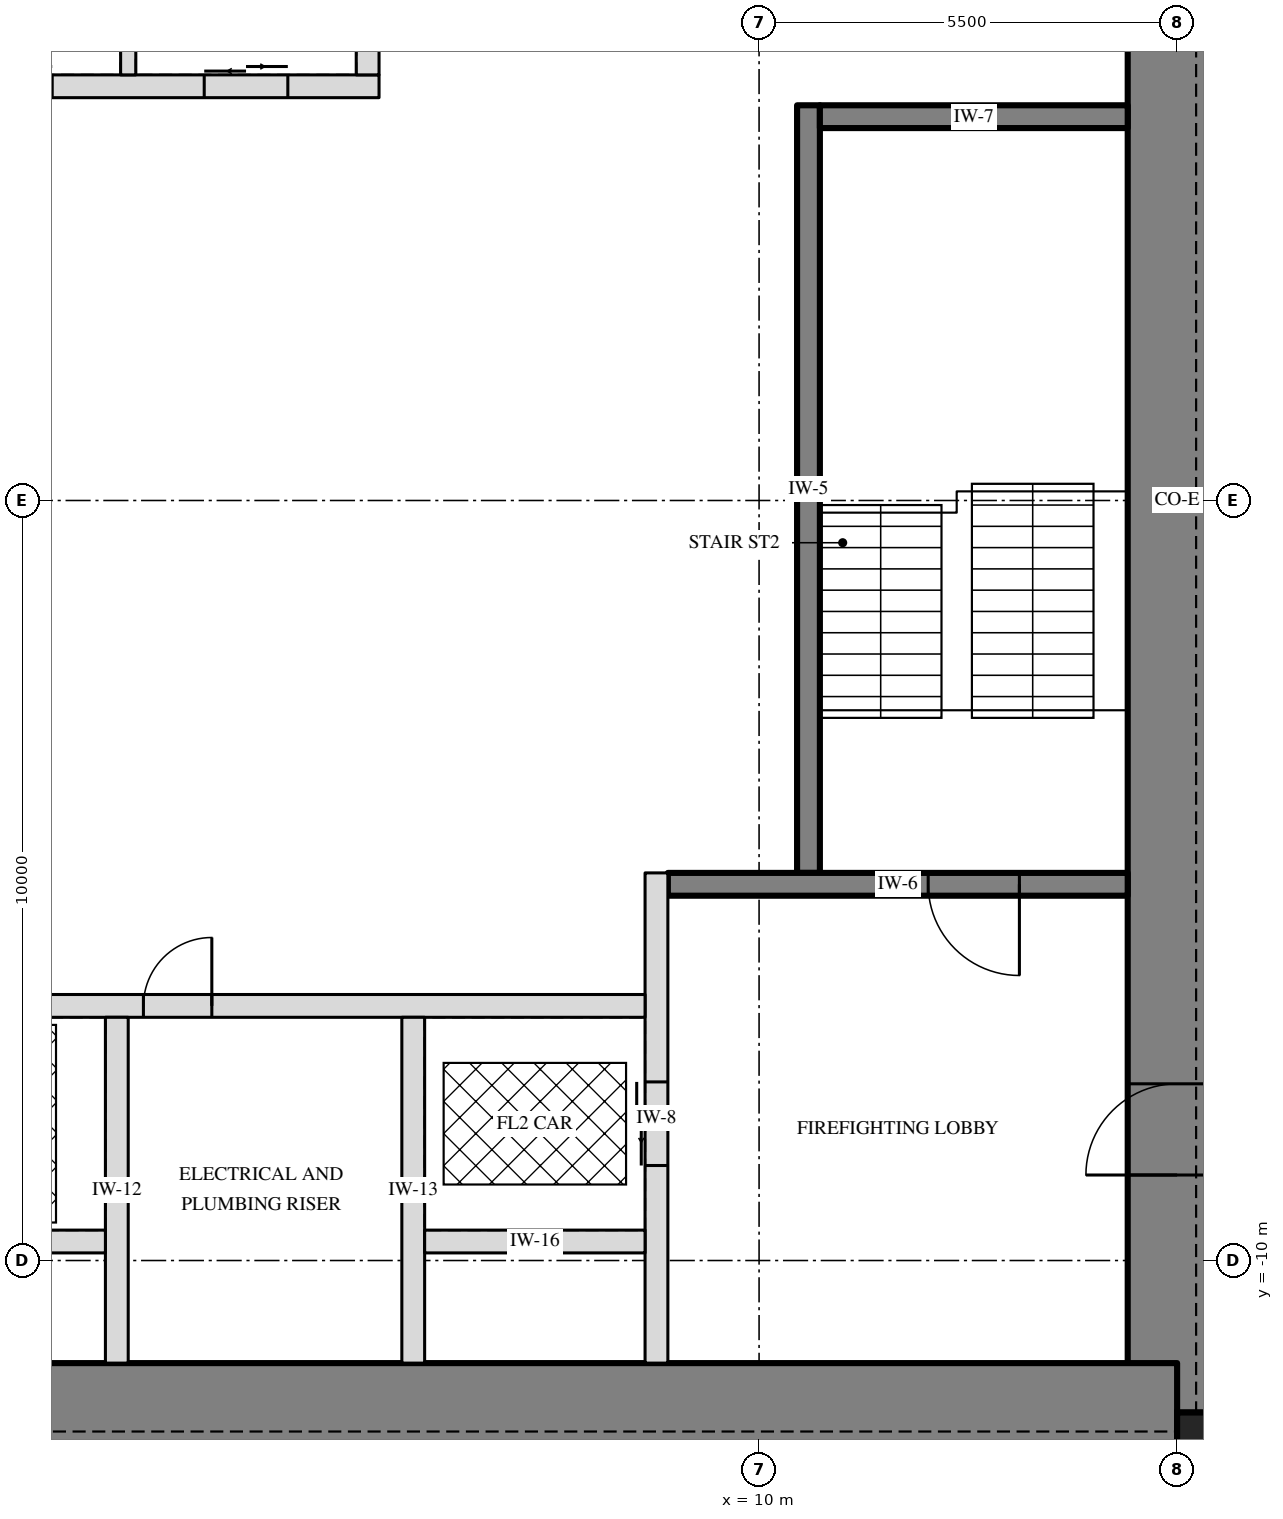
"""IFC4 building model, lengths in metres.
Left out: names, types, materials, properties, quantities, classifications, styles, units other than length and angle.
Written with IfcOpenShell. Run it as: python <this file> out.ifc"""

import sys

from ifc_helpers import new_model, si_unit, direction, frame, frame_2d, origin, origin_2d, place, context, subcontext, project, spatial, rectangle, extrude, element, fill, save


model = new_model("IFC4")
c1 = context("Model", 3, precision=1e-05, world=origin(), true_north=direction((0.0, 1.0)))
c2 = subcontext(c1, "Body", "Model", "MODEL_VIEW")
j1 = project(units=[si_unit("LENGTHUNIT", "METRE"), si_unit("PLANEANGLEUNIT", "RADIAN")], contexts=[c1])
p1 = place(None, origin())
s1 = spatial("IfcSite", under=j1, at=p1, CompositionType="ELEMENT")
p2 = place(p1, origin())
s2 = spatial("IfcBuilding", under=s1, at=p2, CompositionType="ELEMENT")
p3 = place(p2, frame((0.0, 0.0, 285.75)))
s3 = spatial("IfcBuildingStorey", under=s2, at=p3, CompositionType="ELEMENT", Elevation=285.75)
p4 = place(p3, frame((15.5, -12.0, -0.25), z_axis=(0.0, 0.0, 1.0), x_axis=(0.0, 1.0, 0.0)))
e1 = element("IfcWall", 1, at=p4, inside=s3, PredefinedType="SHEAR", context=c2, shape_type="SweptSolid", body=[
    extrude(rectangle(XDim=24.0, YDim=1.3, at=frame_2d((12.0, 0.0))), origin(), (0.0, 0.0, 1.0), 3.75),
])
p5 = place(p4, frame((3.125, 0.0, 0.25)))
e2 = element("IfcOpeningElement", 2, at=p5, cuts=e1, PredefinedType="OPENING", context=c2, shape_type="SweptSolid", body=[
    extrude(rectangle(XDim=1.2, YDim=2.1, at=frame_2d((0.6, 1.05))), frame((0.0, 0.66, 0.0), z_axis=(0.0, -1.0, 0.0), x_axis=(1.0, 0.0, 0.0)), (0.0, 0.0, 1.0), 1.32),
])
p6 = place(p4, frame((19.375, 0.0, 0.25)))
e3 = element("IfcOpeningElement", 3, at=p6, cuts=e1, PredefinedType="OPENING", context=c2, shape_type="SweptSolid", body=[
    extrude(rectangle(XDim=1.8, YDim=2.1, at=frame_2d((0.9, 1.05))), frame((0.0, 0.66, 0.0), z_axis=(0.0, -1.0, 0.0), x_axis=(1.0, 0.0, 0.0)), (0.0, 0.0, 1.0), 1.32),
])
p7 = place(p3, frame((-15.5, -12.0, -0.25), z_axis=(0.0, 0.0, 1.0), x_axis=(1.0, 0.0, 0.0)))
e4 = element("IfcWall", 4, at=p7, inside=s3, PredefinedType="SHEAR", context=c2, shape_type="SweptSolid", body=[
    extrude(rectangle(XDim=31.0, YDim=1.3, at=frame_2d((15.5, 0.0))), origin(), (0.0, 0.0, 1.0), 3.75),
])
p8 = place(p3, frame((15.825, -12.325, -0.25), z_axis=(0.0, 0.0, 1.0), x_axis=(1.0, 0.0, 0.0)))
e5 = element("IfcColumn", 5, at=p8, inside=s3, PredefinedType="COLUMN", context=c2, shape_type="SweptSolid", body=[
    extrude(rectangle(XDim=0.65, YDim=0.65, at=origin_2d()), origin(), (0.0, 0.0, 1.0), 3.75),
])
p9 = place(p3, frame((10.65, -4.9, 0.0), z_axis=(0.0, 0.0, 1.0), x_axis=(0.0, 1.0, 0.0)))
e6 = element("IfcWall", 6, at=p9, inside=s3, PredefinedType="SOLIDWALL", context=c2, shape_type="SweptSolid", body=[
    extrude(rectangle(XDim=10.1, YDim=0.3, at=frame_2d((5.05, 0.0))), origin(), (0.0, 0.0, 1.0), 3.5),
])
p10 = place(p3, frame((14.85, -5.05, 0.0), z_axis=(0.0, 0.0, 1.0), x_axis=(-1.0, 0.0, 0.0)))
e7 = element("IfcWall", 7, at=p10, inside=s3, PredefinedType="SOLIDWALL", context=c2, shape_type="SweptSolid", body=[
    extrude(rectangle(XDim=6.05, YDim=0.3, at=frame_2d((3.025, 0.0))), origin(), (0.0, 0.0, 1.0), 3.5),
])
p11 = place(p10, frame((1.425, 0.0, 0.0)))
e8 = element("IfcOpeningElement", 8, at=p11, cuts=e7, PredefinedType="OPENING", context=c2, shape_type="SweptSolid", body=[
    extrude(rectangle(XDim=1.2, YDim=2.1, at=frame_2d((0.6, 1.05))), frame((0.0, 0.16, 0.0), z_axis=(0.0, -1.0, 0.0), x_axis=(1.0, 0.0, 0.0)), (0.0, 0.0, 1.0), 0.32),
])
p12 = place(p3, frame((14.85, 5.05, 0.0), z_axis=(0.0, 0.0, 1.0), x_axis=(-1.0, 0.0, 0.0)))
e9 = element("IfcWall", 9, at=p12, inside=s3, PredefinedType="SOLIDWALL", context=c2, shape_type="SweptSolid", body=[
    extrude(rectangle(XDim=4.05, YDim=0.3, at=frame_2d((2.025, 0.0))), origin(), (0.0, 0.0, 1.0), 3.5),
])
p13 = place(p3, frame((8.65, -11.35, 0.0), z_axis=(0.0, 0.0, 1.0), x_axis=(0.0, 1.0, 0.0)))
e10 = element("IfcWall", 10, at=p13, inside=s3, PredefinedType="PARTITIONING", context=c2, shape_type="SweptSolid", body=[
    extrude(rectangle(XDim=6.45, YDim=0.3, at=frame_2d((3.225, 0.0))), origin(), (0.0, 0.0, 1.0), 3.5),
])
p14 = place(p13, frame((2.6, 0.0, 0.0)))
e11 = element("IfcOpeningElement", 11, at=p14, cuts=e10, PredefinedType="OPENING", context=c2, shape_type="SweptSolid", body=[
    extrude(rectangle(XDim=1.1, YDim=2.1, at=frame_2d((0.55, 1.05))), frame((0.0, 0.16, 0.0), z_axis=(0.0, -1.0, 0.0), x_axis=(1.0, 0.0, 0.0)), (0.0, 0.0, 1.0), 0.32),
])
p15 = place(p3, frame((-8.5, -6.65, 0.0), z_axis=(0.0, 0.0, 1.0), x_axis=(1.0, 0.0, 0.0)))
e12 = element("IfcWall", 12, at=p15, inside=s3, PredefinedType="PARTITIONING", context=c2, shape_type="SweptSolid", body=[
    extrude(rectangle(XDim=17.0, YDim=0.3, at=frame_2d((8.5, 0.0))), origin(), (0.0, 0.0, 1.0), 3.5),
])
p16 = place(p15, frame((7.8, 0.0, 0.0)))
e13 = element("IfcOpeningElement", 13, at=p16, cuts=e12, PredefinedType="OPENING", context=c2, shape_type="SweptSolid", body=[
    extrude(rectangle(XDim=1.3, YDim=2.4, at=frame_2d((0.65, 1.2))), frame((0.0, 0.16, 0.0), z_axis=(0.0, -1.0, 0.0), x_axis=(1.0, 0.0, 0.0)), (0.0, 0.0, 1.0), 0.32),
])
p17 = place(p15, frame((5.65, 0.0, 0.0)))
e14 = element("IfcOpeningElement", 14, at=p17, cuts=e12, PredefinedType="OPENING", context=c2, shape_type="SweptSolid", body=[
    extrude(rectangle(XDim=0.9, YDim=2.1, at=frame_2d((0.45, 1.05))), frame((0.0, 0.16, 0.0), z_axis=(0.0, -1.0, 0.0), x_axis=(1.0, 0.0, 0.0)), (0.0, 0.0, 1.0), 0.32),
])
p18 = place(p15, frame((10.4, 0.0, 0.0)))
e15 = element("IfcOpeningElement", 15, at=p18, cuts=e12, PredefinedType="OPENING", context=c2, shape_type="SweptSolid", body=[
    extrude(rectangle(XDim=0.9, YDim=2.1, at=frame_2d((0.45, 1.05))), frame((0.0, 0.16, 0.0), z_axis=(0.0, -1.0, 0.0), x_axis=(1.0, 0.0, 0.0)), (0.0, 0.0, 1.0), 0.32),
])
for number, where, z_axis, x_axis in (
    (16, (1.55, -11.35, 0.0), (0.0, 0.0, 1.0), (0.0, 1.0, 0.0)),
    (17, (5.45, -11.35, 0.0), (0.0, 0.0, 1.0), (0.0, 1.0, 0.0)),
):
    element("IfcWall", number, at=place(p3, frame(where, z_axis=z_axis, x_axis=x_axis)), inside=s3, PredefinedType="PARTITIONING", context=c2, shape_type="SweptSolid", body=[
        extrude(rectangle(XDim=4.55, YDim=0.3, at=frame_2d((2.275, 0.0))), origin(), (0.0, 0.0, 1.0), 3.5),
    ])
for number, where, z_axis, x_axis in (
    (18, (-1.5, -9.75, 0.0), (0.0, 0.0, 1.0), (1.0, 0.0, 0.0)),
    (19, (5.6, -9.75, 0.0), (0.0, 0.0, 1.0), (1.0, 0.0, 0.0)),
):
    element("IfcWall", number, at=place(p3, frame(where, z_axis=z_axis, x_axis=x_axis)), inside=s3, PredefinedType="PARTITIONING", context=c2, shape_type="SweptSolid", body=[
        extrude(rectangle(XDim=2.9, YDim=0.3, at=frame_2d((1.45, 0.0))), origin(), (0.0, 0.0, 1.0), 3.5),
    ])
p19 = place(p3, frame((-4.7, 5.45, 0.0), z_axis=(0.0, 0.0, 1.0), x_axis=(1.0, 0.0, 0.0)))
e20 = element("IfcWall", 20, at=p19, inside=s3, PredefinedType="PARTITIONING", context=c2, shape_type="SweptSolid", body=[
    extrude(rectangle(XDim=9.7, YDim=0.3, at=frame_2d((4.85, 0.0))), origin(), (0.0, 0.0, 1.0), 3.5),
])
p20 = place(p19, frame((1.2, 0.0, 0.0)))
e21 = element("IfcOpeningElement", 21, at=p20, cuts=e20, PredefinedType="OPENING", context=c2, shape_type="SweptSolid", body=[
    extrude(rectangle(XDim=1.1, YDim=2.1, at=frame_2d((0.55, 1.05))), frame((0.0, 0.16, 0.0), z_axis=(0.0, -1.0, 0.0), x_axis=(1.0, 0.0, 0.0)), (0.0, 0.0, 1.0), 0.32),
])
p21 = place(p19, frame((4.3, 0.0, 0.0)))
e22 = element("IfcOpeningElement", 22, at=p21, cuts=e20, PredefinedType="OPENING", context=c2, shape_type="SweptSolid", body=[
    extrude(rectangle(XDim=1.1, YDim=2.1, at=frame_2d((0.55, 1.05))), frame((0.0, 0.16, 0.0), z_axis=(0.0, -1.0, 0.0), x_axis=(1.0, 0.0, 0.0)), (0.0, 0.0, 1.0), 0.32),
])
p22 = place(p19, frame((7.4, 0.0, 0.0)))
e23 = element("IfcOpeningElement", 23, at=p22, cuts=e20, PredefinedType="OPENING", context=c2, shape_type="SweptSolid", body=[
    extrude(rectangle(XDim=1.1, YDim=2.1, at=frame_2d((0.55, 1.05))), frame((0.0, 0.16, 0.0), z_axis=(0.0, -1.0, 0.0), x_axis=(1.0, 0.0, 0.0)), (0.0, 0.0, 1.0), 0.32),
])
p23 = place(p3, frame((4.85, 5.6, 0.0), z_axis=(0.0, 0.0, 1.0), x_axis=(0.0, 1.0, 0.0)))
e24 = element("IfcWall", 24, at=p23, inside=s3, PredefinedType="PARTITIONING", context=c2, shape_type="SweptSolid", body=[
    extrude(rectangle(XDim=2.8, YDim=0.3, at=frame_2d((1.4, 0.0))), origin(), (0.0, 0.0, 1.0), 3.5),
])
p24 = place(p3, frame((1.7, 5.6, 0.0), z_axis=(0.0, 0.0, 1.0), x_axis=(0.0, 1.0, 0.0)))
e25 = element("IfcWall", 25, at=p24, inside=s3, PredefinedType="PARTITIONING", context=c2, shape_type="SweptSolid", body=[
    extrude(rectangle(XDim=2.8, YDim=0.2, at=frame_2d((1.4, 0.0))), origin(), (0.0, 0.0, 1.0), 3.5),
])
p25 = place(p3, frame((-10.65, 2.8, 0.0), z_axis=(0.0, 0.0, 1.0), x_axis=(1.0, 0.0, 0.0)))
e26 = element("IfcWall", 26, at=p25, inside=s3, PredefinedType="PARTITIONING", context=c2, shape_type="SweptSolid", body=[
    extrude(rectangle(XDim=21.3, YDim=0.3, at=frame_2d((10.65, 0.0))), origin(), (0.0, 0.0, 1.0), 3.5),
])
p26 = place(p25, frame((10.05, 0.0, 0.0)))
e27 = element("IfcOpeningElement", 27, at=p26, cuts=e26, PredefinedType="OPENING", context=c2, shape_type="SweptSolid", body=[
    extrude(rectangle(XDim=1.2, YDim=2.1, at=frame_2d((0.6, 1.05))), frame((0.0, 0.16, 0.0), z_axis=(0.0, -1.0, 0.0), x_axis=(1.0, 0.0, 0.0)), (0.0, 0.0, 1.0), 0.32),
])
p27 = place(p25, frame((19.121, 0.0, 0.0)))
e28 = element("IfcOpeningElement", 28, at=p27, cuts=e26, PredefinedType="OPENING", context=c2, shape_type="SweptSolid", body=[
    extrude(rectangle(XDim=0.9, YDim=2.1, at=frame_2d((0.45, 1.05))), frame((0.0, 0.16, 0.0), z_axis=(0.0, -1.0, 0.0), x_axis=(1.0, 0.0, 0.0)), (0.0, 0.0, 1.0), 0.32),
])
p28 = place(p3, frame((5.1, -6.65, 0.0), z_axis=(0.0, 0.0, 1.0), x_axis=(0.0, 1.0, 0.0)))
e29 = element("IfcWall", 29, at=p28, inside=s3, PredefinedType="PARTITIONING", context=c2, shape_type="SweptSolid", body=[
    extrude(rectangle(XDim=9.45, YDim=0.3, at=frame_2d((4.725, 0.0))), origin(), (0.0, 0.0, 1.0), 3.5),
])
p29 = place(p28, frame((4.275, 0.0, 0.0)))
e30 = element("IfcOpeningElement", 30, at=p29, cuts=e29, PredefinedType="OPENING", context=c2, shape_type="SweptSolid", body=[
    extrude(rectangle(XDim=0.9, YDim=2.1, at=frame_2d((0.45, 1.05))), frame((0.0, 0.16, 0.0), z_axis=(0.0, -1.0, 0.0), x_axis=(1.0, 0.0, 0.0)), (0.0, 0.0, 1.0), 0.32),
])
p30 = place(p3, frame((7.193, -6.65, 0.0), z_axis=(0.0, 0.0, 1.0), x_axis=(0.0, 1.0, 0.0)))
e31 = element("IfcWall", 31, at=p30, inside=s3, PredefinedType="PARTITIONING", context=c2, shape_type="SweptSolid", body=[
    extrude(rectangle(XDim=9.45, YDim=0.3, at=frame_2d((4.725, 0.0))), origin(), (0.0, 0.0, 1.0), 3.5),
])
p31 = place(p3, frame((5.15, 5.3, 0.0), z_axis=(0.0, 0.0, 1.0), x_axis=(0.0, 1.0, 0.0)))
e32 = element("IfcWall", 32, at=p31, inside=s3, PredefinedType="PARTITIONING", context=c2, shape_type="SweptSolid", body=[
    extrude(rectangle(XDim=6.05, YDim=0.3, at=frame_2d((3.025, 0.0))), origin(), (0.0, 0.0, 1.0), 3.5),
])
p32 = place(p31, frame((4.225, 0.0, 0.0)))
e33 = element("IfcOpeningElement", 33, at=p32, cuts=e32, PredefinedType="OPENING", context=c2, shape_type="SweptSolid", body=[
    extrude(rectangle(XDim=0.9, YDim=2.1, at=frame_2d((0.45, 1.05))), frame((0.0, 0.16, 0.0), z_axis=(0.0, -1.0, 0.0), x_axis=(1.0, 0.0, 0.0)), (0.0, 0.0, 1.0), 0.32),
])
p33 = place(p11, origin())
e34 = element("IfcDoor", 34, at=p33, inside=s3, OperationType="SINGLE_SWING_LEFT", PredefinedType="DOOR", context=c2, shape_type="SweptSolid", body=[
    extrude(rectangle(XDim=1.2, YDim=2.1, at=frame_2d((0.6, 1.05))), frame((0.0, 0.025, 0.0), z_axis=(0.0, -1.0, 0.0), x_axis=(1.0, 0.0, 0.0)), (0.0, 0.0, 1.0), 0.05),
])
fill(e8, e34)
p34 = place(p5, origin())
e35 = element("IfcDoor", 35, at=p34, inside=s3, OperationType="SINGLE_SWING_LEFT", PredefinedType="DOOR", context=c2, shape_type="SweptSolid", body=[
    extrude(rectangle(XDim=1.2, YDim=2.1, at=frame_2d((0.6, 1.05))), frame((0.0, 0.025, 0.0), z_axis=(0.0, -1.0, 0.0), x_axis=(1.0, 0.0, 0.0)), (0.0, 0.0, 1.0), 0.05),
])
fill(e2, e35)
p35 = place(p14, origin())
e36 = element("IfcDoor", 36, at=p35, inside=s3, OperationType="DOUBLE_DOOR_SLIDING", PredefinedType="DOOR", context=c2, shape_type="SweptSolid", body=[
    extrude(rectangle(XDim=1.1, YDim=2.1, at=frame_2d((0.55, 1.05))), frame((0.0, 0.025, 0.0), z_axis=(0.0, -1.0, 0.0), x_axis=(1.0, 0.0, 0.0)), (0.0, 0.0, 1.0), 0.05),
])
fill(e11, e36)
p36 = place(p21, origin())
e37 = element("IfcDoor", 37, at=p36, inside=s3, OperationType="DOUBLE_DOOR_SLIDING", PredefinedType="DOOR", context=c2, shape_type="SweptSolid", body=[
    extrude(rectangle(XDim=1.1, YDim=2.1, at=frame_2d((0.55, 1.05))), frame((0.0, 0.025, 0.0), z_axis=(0.0, -1.0, 0.0), x_axis=(1.0, 0.0, 0.0)), (0.0, 0.0, 1.0), 0.05),
])
fill(e22, e37)
p37 = place(p22, origin())
e38 = element("IfcDoor", 38, at=p37, inside=s3, OperationType="DOUBLE_DOOR_SLIDING", PredefinedType="DOOR", context=c2, shape_type="SweptSolid", body=[
    extrude(rectangle(XDim=1.1, YDim=2.1, at=frame_2d((0.55, 1.05))), frame((0.0, 0.025, 0.0), z_axis=(0.0, -1.0, 0.0), x_axis=(1.0, 0.0, 0.0)), (0.0, 0.0, 1.0), 0.05),
])
fill(e23, e38)
p38 = place(p18, origin())
e39 = element("IfcDoor", 39, at=p38, inside=s3, OperationType="SINGLE_SWING_RIGHT", PredefinedType="DOOR", context=c2, shape_type="SweptSolid", body=[
    extrude(rectangle(XDim=0.9, YDim=2.1, at=frame_2d((0.45, 1.05))), frame((0.0, 0.025, 0.0), z_axis=(0.0, -1.0, 0.0), x_axis=(1.0, 0.0, 0.0)), (0.0, 0.0, 1.0), 0.05),
])
fill(e15, e39)
p39 = place(p29, origin())
e40 = element("IfcDoor", 40, at=p39, inside=s3, OperationType="SINGLE_SWING_LEFT", PredefinedType="DOOR", context=c2, shape_type="SweptSolid", body=[
    extrude(rectangle(XDim=0.9, YDim=2.1, at=frame_2d((0.45, 1.05))), frame((0.0, 0.025, 0.0), z_axis=(0.0, -1.0, 0.0), x_axis=(1.0, 0.0, 0.0)), (0.0, 0.0, 1.0), 0.05),
])
fill(e30, e40)
p40 = place(p27, origin())
e41 = element("IfcDoor", 41, at=p40, inside=s3, OperationType="SINGLE_SWING_RIGHT", PredefinedType="DOOR", context=c2, shape_type="SweptSolid", body=[
    extrude(rectangle(XDim=0.9, YDim=2.1, at=frame_2d((0.45, 1.05))), frame((0.0, 0.025, 0.0), z_axis=(0.0, -1.0, 0.0), x_axis=(1.0, 0.0, 0.0)), (0.0, 0.0, 1.0), 0.05),
])
fill(e28, e41)
save(model, sys.argv[1])
